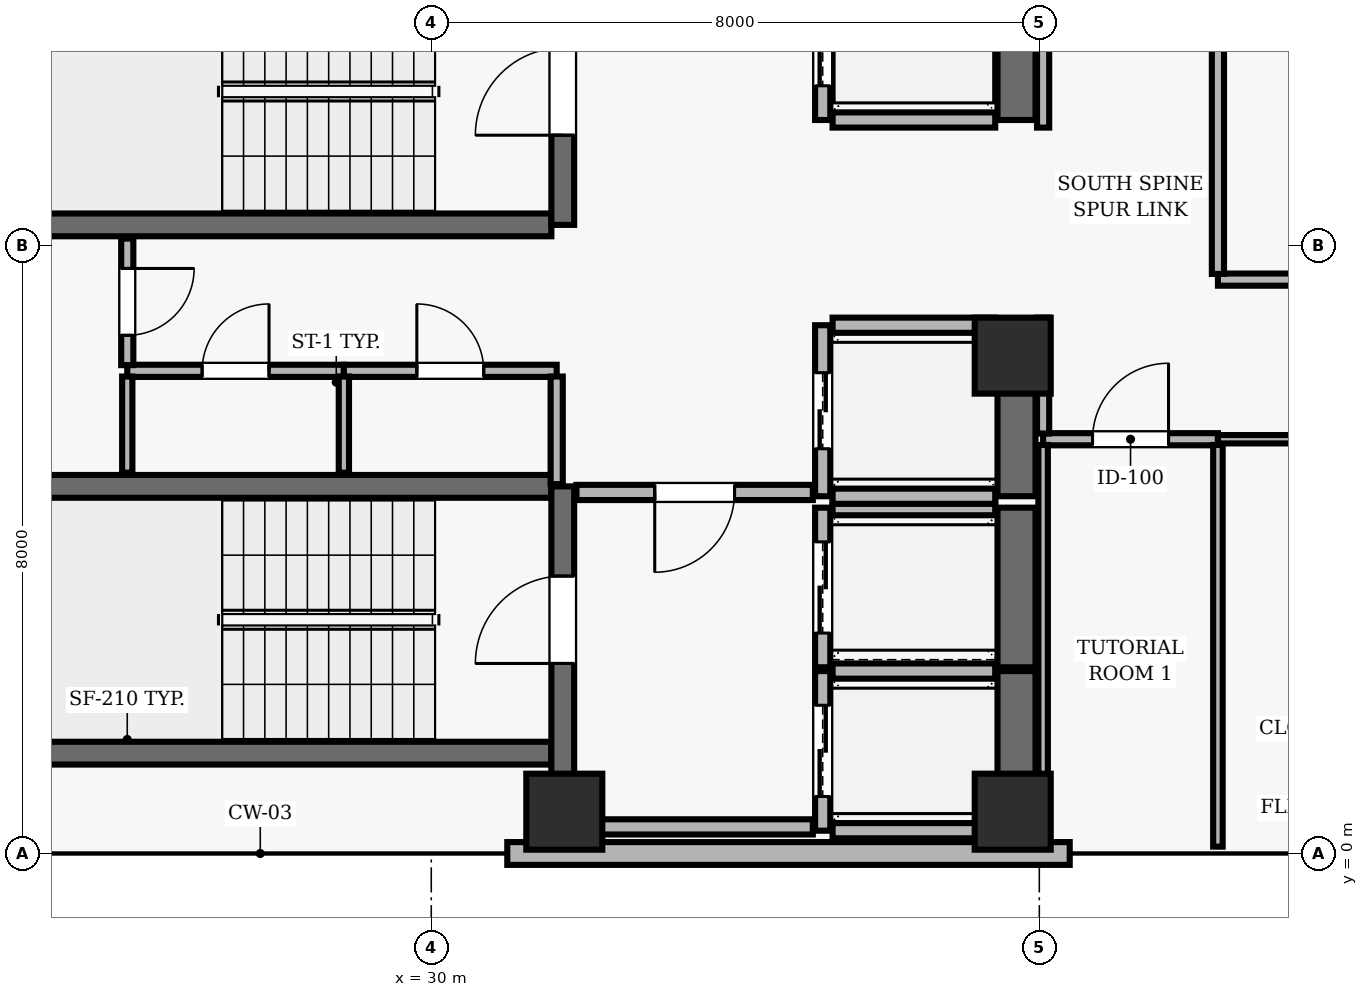
"""IFC4 building model, lengths in metres.
Left out: names, types, materials, properties, quantities, classifications, styles, units other than length and angle.
Written with IfcOpenShell. Run it as: python <this file> out.ifc"""

import sys

from ifc_helpers import new_model, si_unit, direction, frame, frame_2d, origin, origin_2d, place, context, subcontext, project, spatial, rectangle, extrude, element, fill, save


model = new_model("IFC4")
c1 = context("Model", 3, precision=1e-05, world=origin(), true_north=direction((0.0, 1.0)))
c2 = subcontext(c1, "Body", "Model", "MODEL_VIEW")
j1 = project(units=[si_unit("LENGTHUNIT", "METRE"), si_unit("PLANEANGLEUNIT", "RADIAN")], contexts=[c1])
p1 = place(None, origin())
s1 = spatial("IfcSite", under=j1, at=p1, CompositionType="ELEMENT")
p2 = place(p1, origin())
s2 = spatial("IfcBuilding", under=s1, at=p2, CompositionType="ELEMENT")
p3 = place(p2, frame((0.0, 0.0, 230.4)))
s3 = spatial("IfcBuildingStorey", under=s2, at=p3, CompositionType="ELEMENT", Elevation=230.4)
for number, where, z_axis, x_axis in (
    (1, (31.75, 0.55, 0.0), (0.0, 0.0, 1.0), (1.0, 0.0, 0.0)),
    (2, (37.65, 0.55, 0.0), (0.0, 0.0, 1.0), (1.0, 0.0, 0.0)),
    (3, (37.65, 6.55, 0.0), (0.0, 0.0, 1.0), (1.0, 0.0, 0.0)),
):
    element("IfcColumn", number, at=place(p3, frame(where, z_axis=z_axis, x_axis=x_axis)), inside=s3, PredefinedType="COLUMN", context=c2, shape_type="SweptSolid", body=[
        extrude(rectangle(XDim=1.0, YDim=1.0, at=origin_2d()), origin(), (0.0, 0.0, 1.0), 3.9),
    ])
p4 = place(p3, frame((31.0, 0.0, 0.0), z_axis=(0.0, 0.0, 1.0), x_axis=(1.0, 0.0, 0.0)))
e4 = element("IfcWall", 4, at=p4, inside=s3, PredefinedType="SOLIDWALL", context=c2, shape_type="SweptSolid", body=[
    extrude(rectangle(XDim=7.4, YDim=0.3, at=frame_2d((3.7, 0.0))), origin(), (0.0, 0.0, 1.0), 3.69),
])
for number, where, z_axis, x_axis in (
    (5, (31.58, 4.83, 0.0), (0.0, 0.0, 1.0), (-1.0, 0.0, 0.0)),
    (6, (23.22, 1.32, 0.0), (0.0, 0.0, 1.0), (1.0, 0.0, 0.0)),
):
    element("IfcWall", number, at=place(p3, frame(where, z_axis=z_axis, x_axis=x_axis)), inside=s3, PredefinedType="SHEAR", context=c2, shape_type="SweptSolid", body=[
        extrude(rectangle(XDim=8.36, YDim=0.3, at=frame_2d((4.18, 0.0))), origin(), (0.0, 0.0, 1.0), 3.69),
    ])
p5 = place(p3, frame((31.73, 0.96, 0.0), z_axis=(0.0, 0.0, 1.0), x_axis=(0.0, 1.0, 0.0)))
e7 = element("IfcWall", 7, at=p5, inside=s3, PredefinedType="SHEAR", context=c2, shape_type="SweptSolid", body=[
    extrude(rectangle(XDim=3.87, YDim=0.3, at=frame_2d((1.935, 0.0))), origin(), (0.0, 0.0, 1.0), 3.69),
])
p6 = place(p5, frame((1.54, 0.0, 0.0)))
e8 = element("IfcOpeningElement", 8, at=p6, cuts=e7, PredefinedType="OPENING", context=c2, shape_type="SweptSolid", body=[
    extrude(rectangle(XDim=1.15, YDim=2.15, at=frame_2d((0.575, 1.075))), frame((0.0, 0.16, 0.0), z_axis=(0.0, -1.0, 0.0), x_axis=(1.0, 0.0, 0.0)), (0.0, 0.0, 1.0), 0.32),
])
p7 = place(p3, frame((23.22, 8.27, 0.0), z_axis=(0.0, 0.0, 1.0), x_axis=(1.0, 0.0, 0.0)))
e9 = element("IfcWall", 9, at=p7, inside=s3, PredefinedType="SHEAR", context=c2, shape_type="SweptSolid", body=[
    extrude(rectangle(XDim=8.36, YDim=0.3, at=frame_2d((4.18, 0.0))), origin(), (0.0, 0.0, 1.0), 3.69),
])
p8 = place(p3, frame((31.73, 8.27, 0.0), z_axis=(0.0, 0.0, 1.0), x_axis=(0.0, 1.0, 0.0)))
e10 = element("IfcWall", 10, at=p8, inside=s3, PredefinedType="SHEAR", context=c2, shape_type="SweptSolid", body=[
    extrude(rectangle(XDim=3.51, YDim=0.3, at=frame_2d((1.755, 0.0))), origin(), (0.0, 0.0, 1.0), 3.69),
])
p9 = place(p8, frame((1.18, 0.0, 0.0)))
e11 = element("IfcOpeningElement", 11, at=p9, cuts=e10, PredefinedType="OPENING", context=c2, shape_type="SweptSolid", body=[
    extrude(rectangle(XDim=1.15, YDim=2.15, at=frame_2d((0.575, 1.075))), frame((0.0, 0.16, 0.0), z_axis=(0.0, -1.0, 0.0), x_axis=(1.0, 0.0, 0.0)), (0.0, 0.0, 1.0), 0.32),
])
p10 = place(p3, frame((35.15, 2.4, 0.0), z_axis=(0.0, 0.0, 1.0), x_axis=(0.0, -1.0, 0.0)))
e12 = element("IfcWall", 12, at=p10, inside=s3, PredefinedType="SOLIDWALL", context=c2, shape_type="SweptSolid", body=[
    extrude(rectangle(XDim=2.1, YDim=0.2, at=frame_2d((1.05, 0.0))), origin(), (0.0, 0.0, 1.0), 3.69),
])
p11 = place(p10, frame((0.45, 0.0, 0.0)))
e13 = element("IfcOpeningElement", 13, at=p11, cuts=e12, PredefinedType="OPENING", context=c2, shape_type="SweptSolid", body=[
    extrude(rectangle(XDim=1.2, YDim=2.15, at=frame_2d((0.6, 1.075))), frame((0.0, 0.11, 0.0), z_axis=(0.0, -1.0, 0.0), x_axis=(1.0, 0.0, 0.0)), (0.0, 0.0, 1.0), 0.22),
])
p12 = place(p3, frame((37.7, 0.3, 0.0), z_axis=(0.0, 0.0, 1.0), x_axis=(0.0, 1.0, 0.0)))
e14 = element("IfcWall", 14, at=p12, inside=s3, PredefinedType="SHEAR", context=c2, shape_type="SweptSolid", body=[
    extrude(rectangle(XDim=2.1, YDim=0.5, at=frame_2d((1.05, 0.0))), origin(), (0.0, 0.0, 1.0), 3.69),
])
for number, where, z_axis, x_axis in (
    (15, (35.28, 0.3, 0.0), (0.0, 0.0, 1.0), (1.0, 0.0, 0.0)),
    (16, (37.42, 2.4, 0.0), (0.0, 0.0, 1.0), (-1.0, 0.0, 0.0)),
):
    element("IfcWall", number, at=place(p3, frame(where, z_axis=z_axis, x_axis=x_axis)), inside=s3, PredefinedType="SOLIDWALL", context=c2, shape_type="SweptSolid", body=[
        extrude(rectangle(XDim=2.14, YDim=0.2, at=frame_2d((1.07, 0.0))), origin(), (0.0, 0.0, 1.0), 3.69),
    ])
p13 = place(p3, frame((35.15, 4.55, 0.0), z_axis=(0.0, 0.0, 1.0), x_axis=(0.0, -1.0, 0.0)))
e17 = element("IfcWall", 17, at=p13, inside=s3, PredefinedType="SOLIDWALL", context=c2, shape_type="SweptSolid", body=[
    extrude(rectangle(XDim=2.1, YDim=0.2, at=frame_2d((1.05, 0.0))), origin(), (0.0, 0.0, 1.0), 3.69),
])
p14 = place(p13, frame((0.45, 0.0, 0.0)))
e18 = element("IfcOpeningElement", 18, at=p14, cuts=e17, PredefinedType="OPENING", context=c2, shape_type="SweptSolid", body=[
    extrude(rectangle(XDim=1.2, YDim=2.15, at=frame_2d((0.6, 1.075))), frame((0.0, 0.11, 0.0), z_axis=(0.0, -1.0, 0.0), x_axis=(1.0, 0.0, 0.0)), (0.0, 0.0, 1.0), 0.22),
])
p15 = place(p3, frame((37.7, 2.45, 0.0), z_axis=(0.0, 0.0, 1.0), x_axis=(0.0, 1.0, 0.0)))
e19 = element("IfcWall", 19, at=p15, inside=s3, PredefinedType="SHEAR", context=c2, shape_type="SweptSolid", body=[
    extrude(rectangle(XDim=2.1, YDim=0.5, at=frame_2d((1.05, 0.0))), origin(), (0.0, 0.0, 1.0), 3.69),
])
p16 = place(p3, frame((37.42, 4.55, 0.0), z_axis=(0.0, 0.0, 1.0), x_axis=(-1.0, 0.0, 0.0)))
e20 = element("IfcWall", 20, at=p16, inside=s3, PredefinedType="SOLIDWALL", context=c2, shape_type="SweptSolid", body=[
    extrude(rectangle(XDim=2.14, YDim=0.2, at=frame_2d((1.07, 0.0))), origin(), (0.0, 0.0, 1.0), 3.69),
])
p17 = place(p3, frame((35.15, 6.95, 0.0), z_axis=(0.0, 0.0, 1.0), x_axis=(0.0, -1.0, 0.0)))
e21 = element("IfcWall", 21, at=p17, inside=s3, PredefinedType="SOLIDWALL", context=c2, shape_type="SweptSolid", body=[
    extrude(rectangle(XDim=2.25, YDim=0.2, at=frame_2d((1.125, 0.0))), origin(), (0.0, 0.0, 1.0), 3.69),
])
p18 = place(p17, frame((0.625, 0.0, 0.0)))
e22 = element("IfcOpeningElement", 22, at=p18, cuts=e21, PredefinedType="OPENING", context=c2, shape_type="SweptSolid", body=[
    extrude(rectangle(XDim=1.0, YDim=2.1, at=frame_2d((0.5, 1.05))), frame((0.0, 0.11, 0.0), z_axis=(0.0, -1.0, 0.0), x_axis=(1.0, 0.0, 0.0)), (0.0, 0.0, 1.0), 0.22),
])
p19 = place(p3, frame((37.7, 4.7, 0.0), z_axis=(0.0, 0.0, 1.0), x_axis=(0.0, 1.0, 0.0)))
e23 = element("IfcWall", 23, at=p19, inside=s3, PredefinedType="SHEAR", context=c2, shape_type="SweptSolid", body=[
    extrude(rectangle(XDim=2.25, YDim=0.5, at=frame_2d((1.125, 0.0))), origin(), (0.0, 0.0, 1.0), 3.69),
])
for number, where, z_axis, x_axis in (
    (24, (35.28, 4.7, 0.0), (0.0, 0.0, 1.0), (1.0, 0.0, 0.0)),
    (25, (37.42, 6.95, 0.0), (0.0, 0.0, 1.0), (-1.0, 0.0, 0.0)),
):
    element("IfcWall", number, at=place(p3, frame(where, z_axis=z_axis, x_axis=x_axis)), inside=s3, PredefinedType="SOLIDWALL", context=c2, shape_type="SweptSolid", body=[
        extrude(rectangle(XDim=2.14, YDim=0.2, at=frame_2d((1.07, 0.0))), origin(), (0.0, 0.0, 1.0), 3.69),
    ])
p20 = place(p3, frame((35.15, 11.55, 0.0), z_axis=(0.0, 0.0, 1.0), x_axis=(0.0, -1.0, 0.0)))
e26 = element("IfcWall", 26, at=p20, inside=s3, PredefinedType="SOLIDWALL", context=c2, shape_type="SweptSolid", body=[
    extrude(rectangle(XDim=1.9, YDim=0.2, at=frame_2d((0.95, 0.0))), origin(), (0.0, 0.0, 1.0), 3.69),
])
p21 = place(p20, frame((0.45, 0.0, 0.0)))
e27 = element("IfcOpeningElement", 27, at=p21, cuts=e26, PredefinedType="OPENING", context=c2, shape_type="SweptSolid", body=[
    extrude(rectangle(XDim=1.0, YDim=2.1, at=frame_2d((0.5, 1.05))), frame((0.0, 0.11, 0.0), z_axis=(0.0, -1.0, 0.0), x_axis=(1.0, 0.0, 0.0)), (0.0, 0.0, 1.0), 0.22),
])
p22 = place(p3, frame((37.7, 9.65, 0.0), z_axis=(0.0, 0.0, 1.0), x_axis=(0.0, 1.0, 0.0)))
e28 = element("IfcWall", 28, at=p22, inside=s3, PredefinedType="SHEAR", context=c2, shape_type="SweptSolid", body=[
    extrude(rectangle(XDim=1.9, YDim=0.5, at=frame_2d((0.95, 0.0))), origin(), (0.0, 0.0, 1.0), 3.69),
])
p23 = place(p3, frame((35.28, 9.65, 0.0), z_axis=(0.0, 0.0, 1.0), x_axis=(1.0, 0.0, 0.0)))
e29 = element("IfcWall", 29, at=p23, inside=s3, PredefinedType="SOLIDWALL", context=c2, shape_type="SweptSolid", body=[
    extrude(rectangle(XDim=2.14, YDim=0.2, at=frame_2d((1.07, 0.0))), origin(), (0.0, 0.0, 1.0), 3.69),
])
p24 = place(p3, frame((26.0, 6.35, 0.0), z_axis=(0.0, 0.0, 1.0), x_axis=(1.0, 0.0, 0.0)))
e30 = element("IfcWall", 30, at=p24, inside=s3, PredefinedType="PARTITIONING", context=c2, shape_type="SweptSolid", body=[
    extrude(rectangle(XDim=2.85, YDim=0.16, at=frame_2d((1.425, 0.0))), origin(), (0.0, 0.0, 1.0), 3.69),
])
p25 = place(p24, frame((0.985, 0.0, 0.0)))
e31 = element("IfcOpeningElement", 31, at=p25, cuts=e30, PredefinedType="OPENING", context=c2, shape_type="SweptSolid", body=[
    extrude(rectangle(XDim=0.88, YDim=2.1, at=frame_2d((0.44, 1.05))), frame((0.0, 0.09, 0.0), z_axis=(0.0, -1.0, 0.0), x_axis=(1.0, 0.0, 0.0)), (0.0, 0.0, 1.0), 0.18),
])
p26 = place(p3, frame((28.85, 6.35, 0.0), z_axis=(0.0, 0.0, 1.0), x_axis=(1.0, 0.0, 0.0)))
e32 = element("IfcWall", 32, at=p26, inside=s3, PredefinedType="PARTITIONING", context=c2, shape_type="SweptSolid", body=[
    extrude(rectangle(XDim=2.8, YDim=0.16, at=frame_2d((1.4, 0.0))), origin(), (0.0, 0.0, 1.0), 3.69),
])
p27 = place(p26, frame((0.96, 0.0, 0.0)))
e33 = element("IfcOpeningElement", 33, at=p27, cuts=e32, PredefinedType="OPENING", context=c2, shape_type="SweptSolid", body=[
    extrude(rectangle(XDim=0.88, YDim=2.1, at=frame_2d((0.44, 1.05))), frame((0.0, 0.09, 0.0), z_axis=(0.0, -1.0, 0.0), x_axis=(1.0, 0.0, 0.0)), (0.0, 0.0, 1.0), 0.18),
])
p28 = place(p3, frame((31.65, 0.35, 0.0), z_axis=(0.0, 0.0, 1.0), x_axis=(1.0, 0.0, 0.0)))
e34 = element("IfcWall", 34, at=p28, inside=s3, PredefinedType="SOLIDWALL", context=c2, shape_type="SweptSolid", body=[
    extrude(rectangle(XDim=3.37, YDim=0.2, at=frame_2d((1.685, 0.0))), origin(), (0.0, 0.0, 1.0), 3.69),
])
p29 = place(p3, frame((35.02, 4.75, 0.0), z_axis=(0.0, 0.0, 1.0), x_axis=(-1.0, 0.0, 0.0)))
e35 = element("IfcWall", 35, at=p29, inside=s3, PredefinedType="SOLIDWALL", context=c2, shape_type="SweptSolid", body=[
    extrude(rectangle(XDim=3.11, YDim=0.2, at=frame_2d((1.555, 0.0))), origin(), (0.0, 0.0, 1.0), 3.69),
])
p30 = place(p29, frame((1.03, 0.0, 0.0)))
e36 = element("IfcOpeningElement", 36, at=p30, cuts=e35, PredefinedType="OPENING", context=c2, shape_type="SweptSolid", body=[
    extrude(rectangle(XDim=1.05, YDim=2.15, at=frame_2d((0.525, 1.075))), frame((0.0, 0.11, 0.0), z_axis=(0.0, -1.0, 0.0), x_axis=(1.0, 0.0, 0.0)), (0.0, 0.0, 1.0), 0.22),
])
p31 = place(p3, frame((38.05, 5.45, 0.0), z_axis=(0.0, 0.0, 1.0), x_axis=(1.0, 0.0, 0.0)))
e37 = element("IfcWall", 37, at=p31, inside=s3, PredefinedType="PARTITIONING", context=c2, shape_type="SweptSolid", body=[
    extrude(rectangle(XDim=2.3, YDim=0.16, at=frame_2d((1.15, 0.0))), origin(), (0.0, 0.0, 1.0), 3.343),
])
p32 = place(p31, frame((0.65, 0.0, 0.0)))
e38 = element("IfcOpeningElement", 38, at=p32, cuts=e37, PredefinedType="OPENING", context=c2, shape_type="SweptSolid", body=[
    extrude(rectangle(XDim=1.0, YDim=2.1, at=frame_2d((0.5, 1.05))), frame((0.0, 0.09, 0.0), z_axis=(0.0, -1.0, 0.0), x_axis=(1.0, 0.0, 0.0)), (0.0, 0.0, 1.0), 0.18),
])
p33 = place(p3, frame((40.35, 5.45, 0.0), z_axis=(0.0, 0.0, 1.0), x_axis=(1.0, 0.0, 0.0)))
e39 = element("IfcWall", 39, at=p33, inside=s3, PredefinedType="MOVABLE", context=c2, shape_type="SweptSolid", body=[
    extrude(rectangle(XDim=5.65, YDim=0.11, at=frame_2d((2.825, 0.0))), origin(), (0.0, 0.0, 1.0), 3.343),
])
p34 = place(p33, frame((2.375, 0.0, 0.0)))
e40 = element("IfcOpeningElement", 40, at=p34, cuts=e39, PredefinedType="OPENING", context=c2, shape_type="SweptSolid", body=[
    extrude(rectangle(XDim=0.9, YDim=2.1, at=frame_2d((0.45, 1.05))), frame((0.0, 0.065, 0.0), z_axis=(0.0, -1.0, 0.0), x_axis=(1.0, 0.0, 0.0)), (0.0, 0.0, 1.0), 0.13),
])
p35 = place(p3, frame((46.0, 7.55, 0.0), z_axis=(0.0, 0.0, 1.0), x_axis=(-1.0, 0.0, 0.0)))
e41 = element("IfcWall", 41, at=p35, inside=s3, PredefinedType="PARTITIONING", context=c2, shape_type="SweptSolid", body=[
    extrude(rectangle(XDim=5.65, YDim=0.16, at=frame_2d((2.825, 0.0))), origin(), (0.0, 0.0, 1.0), 3.139),
])
p36 = place(p3, frame((26.0, 5.01, 0.0), z_axis=(0.0, 0.0, 1.0), x_axis=(0.0, 1.0, 0.0)))
e42 = element("IfcWall", 42, at=p36, inside=s3, PredefinedType="PARTITIONING", context=c2, shape_type="SweptSolid", body=[
    extrude(rectangle(XDim=1.265, YDim=0.135, at=frame_2d((0.632, 0.0))), origin(), (0.0, 0.0, 1.0), 3.69),
])
p37 = place(p3, frame((26.0, 8.09, 0.0), z_axis=(0.0, 0.0, 1.0), x_axis=(0.0, -1.0, 0.0)))
e43 = element("IfcWall", 43, at=p37, inside=s3, PredefinedType="PARTITIONING", context=c2, shape_type="SweptSolid", body=[
    extrude(rectangle(XDim=1.665, YDim=0.16, at=frame_2d((0.833, 0.0))), origin(), (0.0, 0.0, 1.0), 3.69),
])
p38 = place(p37, frame((0.393, 0.0, 0.0)))
e44 = element("IfcOpeningElement", 44, at=p38, cuts=e43, PredefinedType="OPENING", context=c2, shape_type="SweptSolid", body=[
    extrude(rectangle(XDim=0.88, YDim=2.1, at=frame_2d((0.44, 1.05))), frame((0.0, 0.09, 0.0), z_axis=(0.0, -1.0, 0.0), x_axis=(1.0, 0.0, 0.0)), (0.0, 0.0, 1.0), 0.18),
])
p39 = place(p3, frame((28.85, 5.01, 0.0), z_axis=(0.0, 0.0, 1.0), x_axis=(0.0, 1.0, 0.0)))
e45 = element("IfcWall", 45, at=p39, inside=s3, PredefinedType="PARTITIONING", context=c2, shape_type="SweptSolid", body=[
    extrude(rectangle(XDim=1.265, YDim=0.135, at=frame_2d((0.632, 0.0))), origin(), (0.0, 0.0, 1.0), 3.69),
])
p40 = place(p3, frame((31.65, 4.86, 0.0), z_axis=(0.0, 0.0, 1.0), x_axis=(0.0, 1.0, 0.0)))
e46 = element("IfcWall", 46, at=p40, inside=s3, PredefinedType="PARTITIONING", context=c2, shape_type="SweptSolid", body=[
    extrude(rectangle(XDim=1.415, YDim=0.16, at=frame_2d((0.708, 0.0))), origin(), (0.0, 0.0, 1.0), 3.69),
])
p41 = place(p3, frame((38.05, 5.375, 0.0), z_axis=(0.0, 0.0, 1.0), x_axis=(0.0, -1.0, 0.0)))
e47 = element("IfcWall", 47, at=p41, inside=s3, PredefinedType="PARTITIONING", context=c2, shape_type="SweptSolid", body=[
    extrude(rectangle(XDim=5.23, YDim=0.125, at=frame_2d((2.615, 0.0))), origin(), (0.0, 0.0, 1.0), 3.139),
])
p42 = place(p3, frame((38.05, 7.05, 0.0), z_axis=(0.0, 0.0, 1.0), x_axis=(0.0, -1.0, 0.0)))
e48 = element("IfcWall", 48, at=p42, inside=s3, PredefinedType="PARTITIONING", context=c2, shape_type="SweptSolid", body=[
    extrude(rectangle(XDim=1.525, YDim=0.16, at=frame_2d((0.763, 0.0))), origin(), (0.0, 0.0, 1.0), 3.139),
])
p43 = place(p3, frame((38.05, 15.925, 0.0), z_axis=(0.0, 0.0, 1.0), x_axis=(0.0, -1.0, 0.0)))
e49 = element("IfcWall", 49, at=p43, inside=s3, PredefinedType="PARTITIONING", context=c2, shape_type="SweptSolid", body=[
    extrude(rectangle(XDim=6.375, YDim=0.16, at=frame_2d((3.188, 0.0))), origin(), (0.0, 0.0, 1.0), 3.139),
])
p44 = place(p3, frame((40.35, 0.09, 0.0), z_axis=(0.0, 0.0, 1.0), x_axis=(0.0, 1.0, 0.0)))
e50 = element("IfcWall", 50, at=p44, inside=s3, PredefinedType="PARTITIONING", context=c2, shape_type="SweptSolid", body=[
    extrude(rectangle(XDim=5.285, YDim=0.125, at=frame_2d((2.643, 0.0))), origin(), (0.0, 0.0, 1.0), 3.69),
])
p45 = place(p3, frame((40.35, 7.625, 0.0), z_axis=(0.0, 0.0, 1.0), x_axis=(0.0, 1.0, 0.0)))
e51 = element("IfcWall", 51, at=p45, inside=s3, PredefinedType="PARTITIONING", context=c2, shape_type="SweptSolid", body=[
    extrude(rectangle(XDim=8.3, YDim=0.16, at=frame_2d((4.15, 0.0))), origin(), (0.0, 0.0, 1.0), 3.69),
])
p46 = place(p45, frame((3.65, 0.0, 0.0)))
e52 = element("IfcOpeningElement", 52, at=p46, cuts=e51, PredefinedType="OPENING", context=c2, shape_type="SweptSolid", body=[
    extrude(rectangle(XDim=1.0, YDim=2.1, at=frame_2d((0.5, 1.05))), frame((0.0, 0.09, 0.0), z_axis=(0.0, -1.0, 0.0), x_axis=(1.0, 0.0, 0.0)), (0.0, 0.0, 1.0), 0.18),
])
p47 = place(p6, origin())
e53 = element("IfcDoor", 53, at=p47, inside=s3, OperationType="SINGLE_SWING_LEFT", PredefinedType="DOOR", context=c2, shape_type="SweptSolid", body=[
    extrude(rectangle(XDim=1.15, YDim=2.15, at=frame_2d((0.575, 1.075))), frame((0.0, 0.025, 0.0), z_axis=(0.0, -1.0, 0.0), x_axis=(1.0, 0.0, 0.0)), (0.0, 0.0, 1.0), 0.05),
])
fill(e8, e53)
p48 = place(p9, origin())
e54 = element("IfcDoor", 54, at=p48, inside=s3, OperationType="SINGLE_SWING_LEFT", PredefinedType="DOOR", context=c2, shape_type="SweptSolid", body=[
    extrude(rectangle(XDim=1.15, YDim=2.15, at=frame_2d((0.575, 1.075))), frame((0.0, 0.025, 0.0), z_axis=(0.0, -1.0, 0.0), x_axis=(1.0, 0.0, 0.0)), (0.0, 0.0, 1.0), 0.05),
])
fill(e11, e54)
p49 = place(p11, origin())
e55 = element("IfcDoor", 55, at=p49, inside=s3, OperationType="DOUBLE_DOOR_SLIDING", PredefinedType="DOOR", context=c2, shape_type="SweptSolid", body=[
    extrude(rectangle(XDim=1.2, YDim=2.15, at=frame_2d((0.6, 1.075))), frame((0.0, 0.025, 0.0), z_axis=(0.0, -1.0, 0.0), x_axis=(1.0, 0.0, 0.0)), (0.0, 0.0, 1.0), 0.05),
])
fill(e13, e55)
p50 = place(p14, origin())
e56 = element("IfcDoor", 56, at=p50, inside=s3, OperationType="DOUBLE_DOOR_SLIDING", PredefinedType="DOOR", context=c2, shape_type="SweptSolid", body=[
    extrude(rectangle(XDim=1.2, YDim=2.15, at=frame_2d((0.6, 1.075))), frame((0.0, 0.025, 0.0), z_axis=(0.0, -1.0, 0.0), x_axis=(1.0, 0.0, 0.0)), (0.0, 0.0, 1.0), 0.05),
])
fill(e18, e56)
p51 = place(p18, origin())
e57 = element("IfcDoor", 57, at=p51, inside=s3, OperationType="DOUBLE_DOOR_SLIDING", PredefinedType="DOOR", context=c2, shape_type="SweptSolid", body=[
    extrude(rectangle(XDim=1.0, YDim=2.1, at=frame_2d((0.5, 1.05))), frame((0.0, 0.025, 0.0), z_axis=(0.0, -1.0, 0.0), x_axis=(1.0, 0.0, 0.0)), (0.0, 0.0, 1.0), 0.05),
])
fill(e22, e57)
p52 = place(p21, origin())
e58 = element("IfcDoor", 58, at=p52, inside=s3, OperationType="DOUBLE_DOOR_SLIDING", PredefinedType="DOOR", context=c2, shape_type="SweptSolid", body=[
    extrude(rectangle(XDim=1.0, YDim=2.1, at=frame_2d((0.5, 1.05))), frame((0.0, 0.025, 0.0), z_axis=(0.0, -1.0, 0.0), x_axis=(1.0, 0.0, 0.0)), (0.0, 0.0, 1.0), 0.05),
])
fill(e27, e58)
p53 = place(p30, origin())
e59 = element("IfcDoor", 59, at=p53, inside=s3, OperationType="SINGLE_SWING_RIGHT", PredefinedType="DOOR", context=c2, shape_type="SweptSolid", body=[
    extrude(rectangle(XDim=1.05, YDim=2.15, at=frame_2d((0.525, 1.075))), frame((0.0, 0.025, 0.0), z_axis=(0.0, -1.0, 0.0), x_axis=(1.0, 0.0, 0.0)), (0.0, 0.0, 1.0), 0.05),
])
fill(e36, e59)
p54 = place(p38, origin())
e60 = element("IfcDoor", 60, at=p54, inside=s3, OperationType="SINGLE_SWING_LEFT", PredefinedType="DOOR", context=c2, shape_type="SweptSolid", body=[
    extrude(rectangle(XDim=0.88, YDim=2.1, at=frame_2d((0.44, 1.05))), frame((0.0, 0.025, 0.0), z_axis=(0.0, -1.0, 0.0), x_axis=(1.0, 0.0, 0.0)), (0.0, 0.0, 1.0), 0.05),
])
fill(e44, e60)
p55 = place(p25, origin())
e61 = element("IfcDoor", 61, at=p55, inside=s3, OperationType="SINGLE_SWING_RIGHT", PredefinedType="DOOR", context=c2, shape_type="SweptSolid", body=[
    extrude(rectangle(XDim=0.88, YDim=2.1, at=frame_2d((0.44, 1.05))), frame((0.0, 0.025, 0.0), z_axis=(0.0, -1.0, 0.0), x_axis=(1.0, 0.0, 0.0)), (0.0, 0.0, 1.0), 0.05),
])
fill(e31, e61)
p56 = place(p27, origin())
e62 = element("IfcDoor", 62, at=p56, inside=s3, OperationType="SINGLE_SWING_LEFT", PredefinedType="DOOR", context=c2, shape_type="SweptSolid", body=[
    extrude(rectangle(XDim=0.88, YDim=2.1, at=frame_2d((0.44, 1.05))), frame((0.0, 0.025, 0.0), z_axis=(0.0, -1.0, 0.0), x_axis=(1.0, 0.0, 0.0)), (0.0, 0.0, 1.0), 0.05),
])
fill(e33, e62)
p57 = place(p32, origin())
e63 = element("IfcDoor", 63, at=p57, inside=s3, OperationType="SINGLE_SWING_RIGHT", PredefinedType="DOOR", context=c2, shape_type="SweptSolid", body=[
    extrude(rectangle(XDim=1.0, YDim=2.1, at=frame_2d((0.5, 1.05))), frame((0.0, 0.025, 0.0), z_axis=(0.0, -1.0, 0.0), x_axis=(1.0, 0.0, 0.0)), (0.0, 0.0, 1.0), 0.05),
])
fill(e38, e63)
save(model, sys.argv[1])
